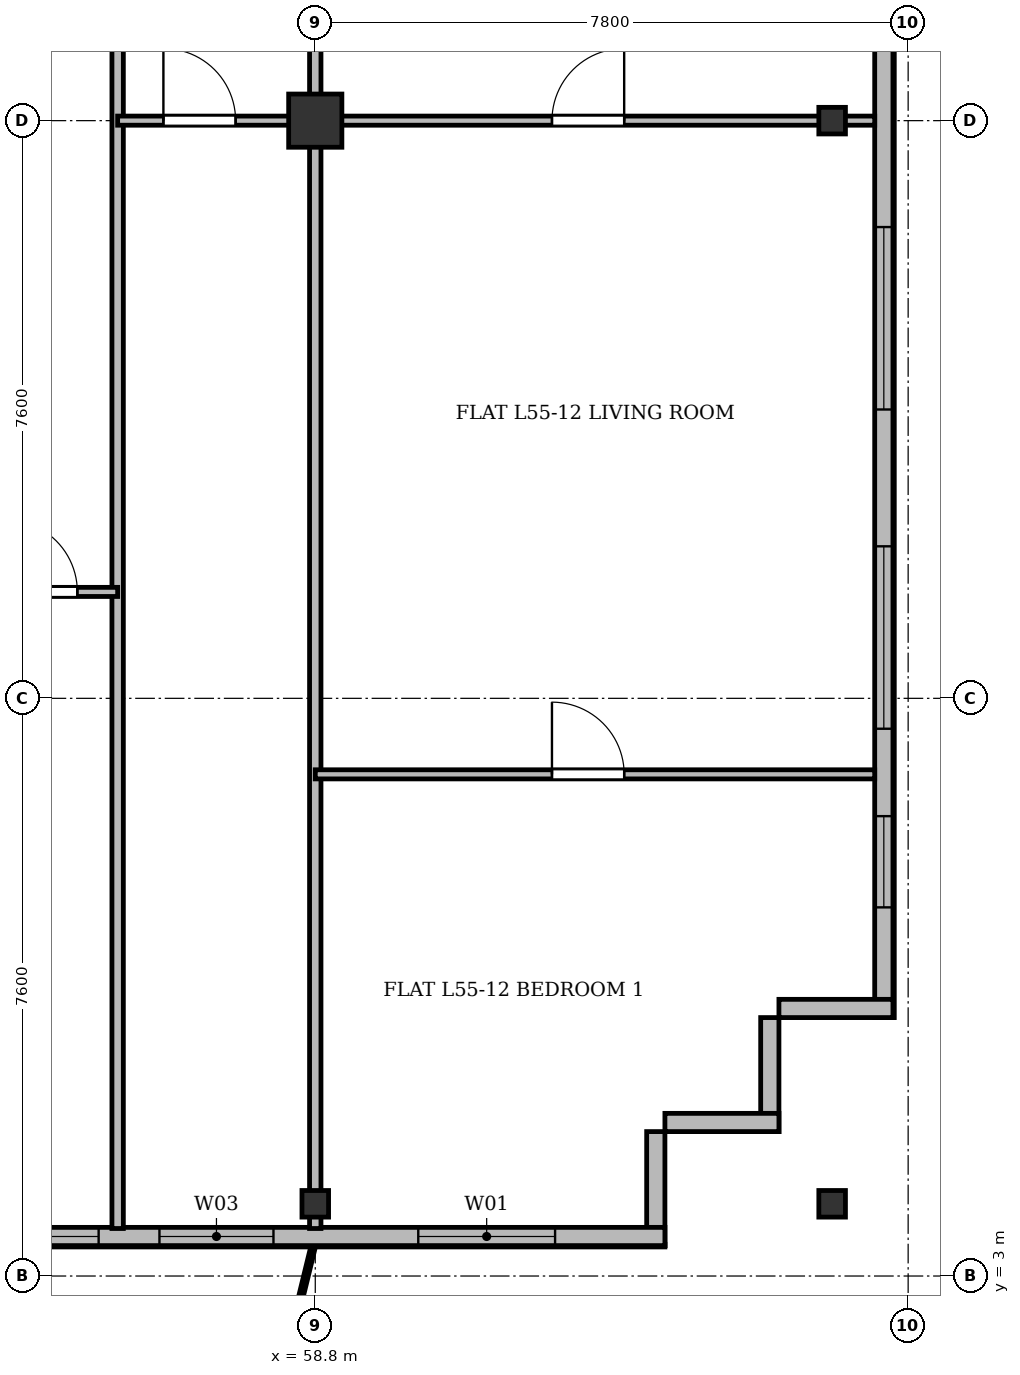
"""IFC4 building model, lengths in metres.
Left out: names, types, materials, properties, quantities, classifications, styles, units other than length and angle.
Written with IfcOpenShell. Run it as: python <this file> out.ifc"""

import sys

from ifc_helpers import new_model, si_unit, direction, frame, frame_2d, origin, origin_2d, place, context, subcontext, project, spatial, rectangle, i_section, extrude, source, transform, mapped, element, fill, save


model = new_model("IFC4")
c1 = context("Model", 3, precision=1e-05, world=origin(), true_north=direction((0.0, 1.0)))
c2 = subcontext(c1, "Body", "Model", "MODEL_VIEW")
j1 = project(units=[si_unit("LENGTHUNIT", "METRE"), si_unit("PLANEANGLEUNIT", "RADIAN")], contexts=[c1])
p1 = place(None, origin())
s1 = spatial("IfcSite", under=j1, at=p1, CompositionType="ELEMENT")
p2 = place(p1, origin())
s2 = spatial("IfcBuilding", under=s1, at=p2, CompositionType="ELEMENT")
p3 = place(p2, frame((0.0, 0.0, 212.1)))
s3 = spatial("IfcBuildingStorey", under=s2, at=p3, CompositionType="ELEMENT", Elevation=212.1)
m1 = source(origin(), c2, "Body", "SweptSolid", [
    extrude(i_section(OverallWidth=0.35, OverallDepth=0.35, WebThickness=0.018, FlangeThickness=0.028, at=origin_2d()), origin(), (0.0, 0.0, 1.0), 3.6),
])
p4 = place(p3, frame((58.8, 3.95, 0.0), z_axis=(0.0, 0.0, 1.0), x_axis=(1.0, 0.0, 0.0)))
e1 = element("IfcColumn", 1, at=p4, inside=s3, PredefinedType="COLUMN", context=c2, shape_type="MappedRepresentation", body=[
    mapped(m1, transform((0.0, 0.0, 0.0), x_axis=(1.0, 0.0, 0.0), y_axis=(0.0, 1.0, 0.0), z_axis=(0.0, 0.0, 1.0), scale=1.0)),
])
m2 = source(origin(), c2, "Body", "SweptSolid", [
    extrude(rectangle(XDim=0.7, YDim=0.7, at=origin_2d()), origin(), (0.0, 0.0, 1.0), 3.6),
])
p5 = place(p3, frame((58.8, 18.2, 0.0), z_axis=(0.0, 0.0, 1.0), x_axis=(1.0, 0.0, 0.0)))
e2 = element("IfcColumn", 2, at=p5, inside=s3, PredefinedType="COLUMN", context=c2, shape_type="MappedRepresentation", body=[
    mapped(m2, transform((0.0, 0.0, 0.0), x_axis=(1.0, 0.0, 0.0), y_axis=(0.0, 1.0, 0.0), z_axis=(0.0, 0.0, 1.0), scale=1.0)),
])
for number, where, z_axis, x_axis in (
    (3, (65.6, 3.95, 0.0), (0.0, 0.0, 1.0), (1.0, 0.0, 0.0)),
    (4, (65.6, 18.2, 0.0), (0.0, 0.0, 1.0), (1.0, 0.0, 0.0)),
):
    element("IfcColumn", number, at=place(p3, frame(where, z_axis=z_axis, x_axis=x_axis)), inside=s3, PredefinedType="COLUMN", context=c2, shape_type="MappedRepresentation", body=[
        mapped(m1, transform((0.0, 0.0, 0.0), x_axis=(1.0, 0.0, 0.0), y_axis=(0.0, 1.0, 0.0), z_axis=(0.0, 0.0, 1.0), scale=1.0)),
    ])
p6 = place(p3, frame((66.28, 45.5, 0.0), z_axis=(0.0, 0.0, 1.0), x_axis=(0.0, -1.0, 0.0)))
e5 = element("IfcWall", 5, at=p6, inside=s3, PredefinedType="SOLIDWALL", context=c2, shape_type="SweptSolid", body=[
    extrude(rectangle(XDim=39.1, YDim=0.24, at=frame_2d((19.55, 0.0))), origin(), (0.0, 0.0, 1.0), 3.36),
])
p7 = place(p6, frame((36.45, 0.0, 0.92)))
e6 = element("IfcOpeningElement", 6, at=p7, cuts=e5, PredefinedType="OPENING", context=c2, shape_type="SweptSolid", body=[
    extrude(rectangle(XDim=1.2, YDim=1.65, at=frame_2d((0.6, 0.825))), frame((0.0, 0.13, 0.0), z_axis=(0.0, -1.0, 0.0), x_axis=(1.0, 0.0, 0.0)), (0.0, 0.0, 1.0), 0.26),
])
p8 = place(p6, frame((32.9, 0.0, 0.92)))
e7 = element("IfcOpeningElement", 7, at=p8, cuts=e5, PredefinedType="OPENING", context=c2, shape_type="SweptSolid", body=[
    extrude(rectangle(XDim=2.4, YDim=2.1, at=frame_2d((1.2, 1.05))), frame((0.0, 0.13, 0.0), z_axis=(0.0, -1.0, 0.0), x_axis=(1.0, 0.0, 0.0)), (0.0, 0.0, 1.0), 0.26),
])
p9 = place(p6, frame((28.7, 0.0, 0.92)))
e8 = element("IfcOpeningElement", 8, at=p9, cuts=e5, PredefinedType="OPENING", context=c2, shape_type="SweptSolid", body=[
    extrude(rectangle(XDim=2.4, YDim=2.1, at=frame_2d((1.2, 1.05))), frame((0.0, 0.13, 0.0), z_axis=(0.0, -1.0, 0.0), x_axis=(1.0, 0.0, 0.0)), (0.0, 0.0, 1.0), 0.26),
])
p10 = place(p6, frame((21.5, 0.0, 0.92)))
e9 = element("IfcOpeningElement", 9, at=p10, cuts=e5, PredefinedType="OPENING", context=c2, shape_type="SweptSolid", body=[
    extrude(rectangle(XDim=2.4, YDim=2.1, at=frame_2d((1.2, 1.05))), frame((0.0, 0.13, 0.0), z_axis=(0.0, -1.0, 0.0), x_axis=(1.0, 0.0, 0.0)), (0.0, 0.0, 1.0), 0.26),
])
p11 = place(p6, frame((7.5, 0.0, 0.92)))
e10 = element("IfcOpeningElement", 10, at=p11, cuts=e5, PredefinedType="OPENING", context=c2, shape_type="SweptSolid", body=[
    extrude(rectangle(XDim=2.4, YDim=2.1, at=frame_2d((1.2, 1.05))), frame((0.0, 0.13, 0.0), z_axis=(0.0, -1.0, 0.0), x_axis=(1.0, 0.0, 0.0)), (0.0, 0.0, 1.0), 0.26),
])
p12 = place(p6, frame((4.5, 0.0, 0.92)))
e11 = element("IfcOpeningElement", 11, at=p12, cuts=e5, PredefinedType="OPENING", context=c2, shape_type="SweptSolid", body=[
    extrude(rectangle(XDim=1.2, YDim=1.65, at=frame_2d((0.6, 0.825))), frame((0.0, 0.13, 0.0), z_axis=(0.0, -1.0, 0.0), x_axis=(1.0, 0.0, 0.0)), (0.0, 0.0, 1.0), 0.26),
])
p13 = place(p6, frame((1.15, 0.0, 0.92)))
e12 = element("IfcOpeningElement", 12, at=p13, cuts=e5, PredefinedType="OPENING", context=c2, shape_type="SweptSolid", body=[
    extrude(rectangle(XDim=1.2, YDim=1.65, at=frame_2d((0.6, 0.825))), frame((0.0, 0.13, 0.0), z_axis=(0.0, -1.0, 0.0), x_axis=(1.0, 0.0, 0.0)), (0.0, 0.0, 1.0), 0.26),
])
p14 = place(p3, frame((66.4, 6.52, 0.0), z_axis=(0.0, 0.0, 1.0), x_axis=(-1.0, 0.0, 0.0)))
e13 = element("IfcWall", 13, at=p14, inside=s3, PredefinedType="SOLIDWALL", context=c2, shape_type="SweptSolid", body=[
    extrude(rectangle(XDim=1.5, YDim=0.24, at=frame_2d((0.75, 0.0))), origin(), (0.0, 0.0, 1.0), 2.86),
])
for number, where, z_axis, x_axis in (
    (14, (64.78, 6.4, 0.0), (0.0, 0.0, 1.0), (0.0, -1.0, 0.0)),
    (15, (64.9, 5.02, 0.0), (0.0, 0.0, 1.0), (-1.0, 0.0, 0.0)),
):
    element("IfcWall", number, at=place(p3, frame(where, z_axis=z_axis, x_axis=x_axis)), inside=s3, PredefinedType="SOLIDWALL", context=c2, shape_type="SweptSolid", body=[
        extrude(rectangle(XDim=1.5, YDim=0.24, at=frame_2d((0.75, 0.0))), origin(), (0.0, 0.0, 1.0), 3.36),
    ])
p15 = place(p3, frame((63.28, 4.9, 0.0), z_axis=(0.0, 0.0, 1.0), x_axis=(0.0, -1.0, 0.0)))
e16 = element("IfcWall", 16, at=p15, inside=s3, PredefinedType="SOLIDWALL", context=c2, shape_type="SweptSolid", body=[
    extrude(rectangle(XDim=1.5, YDim=0.24, at=frame_2d((0.75, 0.0))), origin(), (0.0, 0.0, 1.0), 2.91),
])
p16 = place(p3, frame((63.4, 3.52, 0.0), z_axis=(0.0, 0.0, 1.0), x_axis=(-1.0, 0.0, 0.0)))
e17 = element("IfcWall", 17, at=p16, inside=s3, PredefinedType="SOLIDWALL", context=c2, shape_type="SweptSolid", body=[
    extrude(rectangle(XDim=52.4, YDim=0.24, at=frame_2d((26.2, 0.0))), origin(), (0.0, 0.0, 1.0), 3.36),
])
p17 = place(p16, frame((1.445, 0.0, 0.9)))
e18 = element("IfcOpeningElement", 18, at=p17, cuts=e17, PredefinedType="OPENING", context=c2, shape_type="SweptSolid", body=[
    extrude(rectangle(XDim=1.8, YDim=1.8, at=frame_2d((0.9, 0.9))), frame((0.0, 0.13, 0.0), z_axis=(0.0, -1.0, 0.0), x_axis=(1.0, 0.0, 0.0)), (0.0, 0.0, 1.0), 0.26),
])
p18 = place(p16, frame((5.15, 0.0, 0.9)))
e19 = element("IfcOpeningElement", 19, at=p18, cuts=e17, PredefinedType="OPENING", context=c2, shape_type="SweptSolid", body=[
    extrude(rectangle(XDim=1.5, YDim=1.75, at=frame_2d((0.75, 0.875))), frame((0.0, 0.13, 0.0), z_axis=(0.0, -1.0, 0.0), x_axis=(1.0, 0.0, 0.0)), (0.0, 0.0, 1.0), 0.26),
])
p19 = place(p16, frame((7.45, 0.0, 0.9)))
e20 = element("IfcOpeningElement", 20, at=p19, cuts=e17, PredefinedType="OPENING", context=c2, shape_type="SweptSolid", body=[
    extrude(rectangle(XDim=1.5, YDim=1.75, at=frame_2d((0.75, 0.875))), frame((0.0, 0.13, 0.0), z_axis=(0.0, -1.0, 0.0), x_axis=(1.0, 0.0, 0.0)), (0.0, 0.0, 1.0), 0.26),
])
p20 = place(p16, frame((9.8, 0.0, 0.9)))
e21 = element("IfcOpeningElement", 21, at=p20, cuts=e17, PredefinedType="OPENING", context=c2, shape_type="SweptSolid", body=[
    extrude(rectangle(XDim=2.0, YDim=1.95, at=frame_2d((1.0, 0.975))), frame((0.0, 0.13, 0.0), z_axis=(0.0, -1.0, 0.0), x_axis=(1.0, 0.0, 0.0)), (0.0, 0.0, 1.0), 0.26),
])
p21 = place(p16, frame((14.217, 0.0, 0.0)))
e22 = element("IfcOpeningElement", 22, at=p21, cuts=e17, PredefinedType="OPENING", context=c2, shape_type="SweptSolid", body=[
    extrude(rectangle(XDim=1.2, YDim=2.2, at=frame_2d((0.6, 1.1))), frame((0.0, 0.13, 0.0), z_axis=(0.0, -1.0, 0.0), x_axis=(1.0, 0.0, 0.0)), (0.0, 0.0, 1.0), 0.26),
])
p22 = place(p16, frame((20.034, 0.0, 0.9)))
e23 = element("IfcOpeningElement", 23, at=p22, cuts=e17, PredefinedType="OPENING", context=c2, shape_type="SweptSolid", body=[
    extrude(rectangle(XDim=1.8, YDim=1.8, at=frame_2d((0.9, 0.9))), frame((0.0, 0.13, 0.0), z_axis=(0.0, -1.0, 0.0), x_axis=(1.0, 0.0, 0.0)), (0.0, 0.0, 1.0), 0.26),
])
p23 = place(p16, frame((22.5, 0.0, 0.9)))
e24 = element("IfcOpeningElement", 24, at=p23, cuts=e17, PredefinedType="OPENING", context=c2, shape_type="SweptSolid", body=[
    extrude(rectangle(XDim=2.2, YDim=1.8, at=frame_2d((1.1, 0.9))), frame((0.0, 0.13, 0.0), z_axis=(0.0, -1.0, 0.0), x_axis=(1.0, 0.0, 0.0)), (0.0, 0.0, 1.0), 0.26),
])
p24 = place(p16, frame((25.517, 0.0, 0.9)))
e25 = element("IfcOpeningElement", 25, at=p24, cuts=e17, PredefinedType="OPENING", context=c2, shape_type="SweptSolid", body=[
    extrude(rectangle(XDim=1.5, YDim=1.75, at=frame_2d((0.75, 0.875))), frame((0.0, 0.13, 0.0), z_axis=(0.0, -1.0, 0.0), x_axis=(1.0, 0.0, 0.0)), (0.0, 0.0, 1.0), 0.26),
])
p25 = place(p16, frame((29.2, 0.0, 0.9)))
e26 = element("IfcOpeningElement", 26, at=p25, cuts=e17, PredefinedType="OPENING", context=c2, shape_type="SweptSolid", body=[
    extrude(rectangle(XDim=2.0, YDim=1.95, at=frame_2d((1.0, 0.975))), frame((0.0, 0.13, 0.0), z_axis=(0.0, -1.0, 0.0), x_axis=(1.0, 0.0, 0.0)), (0.0, 0.0, 1.0), 0.26),
])
p26 = place(p16, frame((33.175, 0.0, 0.9)))
e27 = element("IfcOpeningElement", 27, at=p26, cuts=e17, PredefinedType="OPENING", context=c2, shape_type="SweptSolid", body=[
    extrude(rectangle(XDim=1.65, YDim=1.85, at=frame_2d((0.825, 0.925))), frame((0.0, 0.13, 0.0), z_axis=(0.0, -1.0, 0.0), x_axis=(1.0, 0.0, 0.0)), (0.0, 0.0, 1.0), 0.26),
])
p27 = place(p16, frame((35.5, 0.0, 0.9)))
e28 = element("IfcOpeningElement", 28, at=p27, cuts=e17, PredefinedType="OPENING", context=c2, shape_type="SweptSolid", body=[
    extrude(rectangle(XDim=1.8, YDim=1.8, at=frame_2d((0.9, 0.9))), frame((0.0, 0.13, 0.0), z_axis=(0.0, -1.0, 0.0), x_axis=(1.0, 0.0, 0.0)), (0.0, 0.0, 1.0), 0.26),
])
p28 = place(p16, frame((38.05, 0.0, 0.9)))
e29 = element("IfcOpeningElement", 29, at=p28, cuts=e17, PredefinedType="OPENING", context=c2, shape_type="SweptSolid", body=[
    extrude(rectangle(XDim=1.5, YDim=1.75, at=frame_2d((0.75, 0.875))), frame((0.0, 0.13, 0.0), z_axis=(0.0, -1.0, 0.0), x_axis=(1.0, 0.0, 0.0)), (0.0, 0.0, 1.0), 0.26),
])
p29 = place(p16, frame((41.456, 0.0, 0.0)))
e30 = element("IfcOpeningElement", 30, at=p29, cuts=e17, PredefinedType="OPENING", context=c2, shape_type="SweptSolid", body=[
    extrude(rectangle(XDim=1.2, YDim=2.2, at=frame_2d((0.6, 1.1))), frame((0.0, 0.13, 0.0), z_axis=(0.0, -1.0, 0.0), x_axis=(1.0, 0.0, 0.0)), (0.0, 0.0, 1.0), 0.26),
])
p30 = place(p16, frame((43.45, 0.0, 0.9)))
e31 = element("IfcOpeningElement", 31, at=p30, cuts=e17, PredefinedType="OPENING", context=c2, shape_type="SweptSolid", body=[
    extrude(rectangle(XDim=1.5, YDim=1.75, at=frame_2d((0.75, 0.875))), frame((0.0, 0.13, 0.0), z_axis=(0.0, -1.0, 0.0), x_axis=(1.0, 0.0, 0.0)), (0.0, 0.0, 1.0), 0.26),
])
p31 = place(p16, frame((45.675, 0.0, 0.9)))
e32 = element("IfcOpeningElement", 32, at=p31, cuts=e17, PredefinedType="OPENING", context=c2, shape_type="SweptSolid", body=[
    extrude(rectangle(XDim=1.65, YDim=1.85, at=frame_2d((0.825, 0.925))), frame((0.0, 0.13, 0.0), z_axis=(0.0, -1.0, 0.0), x_axis=(1.0, 0.0, 0.0)), (0.0, 0.0, 1.0), 0.26),
])
p32 = place(p16, frame((49.155, 0.0, 0.9)))
e33 = element("IfcOpeningElement", 33, at=p32, cuts=e17, PredefinedType="OPENING", context=c2, shape_type="SweptSolid", body=[
    extrude(rectangle(XDim=1.8, YDim=1.8, at=frame_2d((0.9, 0.9))), frame((0.0, 0.13, 0.0), z_axis=(0.0, -1.0, 0.0), x_axis=(1.0, 0.0, 0.0)), (0.0, 0.0, 1.0), 0.26),
])
p33 = place(p3, frame((58.8, 3.625, 0.0), z_axis=(0.0, 0.0, 1.0), x_axis=(0.0, 1.0, 0.0)))
e34 = element("IfcWall", 34, at=p33, inside=s3, PredefinedType="PARTITIONING", context=c2, shape_type="SweptSolid", body=[
    extrude(rectangle(XDim=27.175, YDim=0.15, at=frame_2d((13.587, 0.0))), origin(), (0.0, 0.0, 1.0), 2.86),
])
p34 = place(p3, frame((56.2, 3.625, 0.0), z_axis=(0.0, 0.0, 1.0), x_axis=(0.0, 1.0, 0.0)))
e35 = element("IfcWall", 35, at=p34, inside=s3, PredefinedType="PARTITIONING", context=c2, shape_type="SweptSolid", body=[
    extrude(rectangle(XDim=27.175, YDim=0.15, at=frame_2d((13.587, 0.0))), origin(), (0.0, 0.0, 1.0), 2.91),
])
p35 = place(p3, frame((54.2, 12.0, 0.0), z_axis=(0.0, 0.0, 1.0), x_axis=(1.0, 0.0, 0.0)))
e36 = element("IfcWall", 36, at=p35, inside=s3, PredefinedType="PARTITIONING", context=c2, shape_type="SweptSolid", body=[
    extrude(rectangle(XDim=2.0, YDim=0.12, at=frame_2d((1.0, 0.0))), origin(), (0.0, 0.0, 1.0), 3.36),
])
p36 = place(p35, frame((0.52, 0.0, 0.0)))
e37 = element("IfcOpeningElement", 37, at=p36, cuts=e36, PredefinedType="OPENING", context=c2, shape_type="SweptSolid", body=[
    extrude(rectangle(XDim=0.95, YDim=2.15, at=frame_2d((0.475, 1.075))), frame((0.0, 0.07, 0.0), z_axis=(0.0, -1.0, 0.0), x_axis=(1.0, 0.0, 0.0)), (0.0, 0.0, 1.0), 0.14),
])
p37 = place(p3, frame((56.2, 18.2, 0.0), z_axis=(0.0, 0.0, 1.0), x_axis=(1.0, 0.0, 0.0)))
e38 = element("IfcWall", 38, at=p37, inside=s3, PredefinedType="PARTITIONING", context=c2, shape_type="SweptSolid", body=[
    extrude(rectangle(XDim=2.6, YDim=0.12, at=frame_2d((1.3, 0.0))), origin(), (0.0, 0.0, 1.0), 2.91),
])
p38 = place(p37, frame((0.602, 0.0, 0.0)))
e39 = element("IfcOpeningElement", 39, at=p38, cuts=e38, PredefinedType="OPENING", context=c2, shape_type="SweptSolid", body=[
    extrude(rectangle(XDim=0.95, YDim=2.15, at=frame_2d((0.475, 1.075))), frame((0.0, 0.07, 0.0), z_axis=(0.0, -1.0, 0.0), x_axis=(1.0, 0.0, 0.0)), (0.0, 0.0, 1.0), 0.14),
])
p39 = place(p3, frame((58.8, 18.2, 0.0), z_axis=(0.0, 0.0, 1.0), x_axis=(1.0, 0.0, 0.0)))
e40 = element("IfcWall", 40, at=p39, inside=s3, PredefinedType="PARTITIONING", context=c2, shape_type="SweptSolid", body=[
    extrude(rectangle(XDim=7.36, YDim=0.12, at=frame_2d((3.68, 0.0))), origin(), (0.0, 0.0, 1.0), 2.91),
])
p40 = place(p39, frame((3.114, 0.0, 0.0)))
e41 = element("IfcOpeningElement", 41, at=p40, cuts=e40, PredefinedType="OPENING", context=c2, shape_type="SweptSolid", body=[
    extrude(rectangle(XDim=0.95, YDim=2.15, at=frame_2d((0.475, 1.075))), frame((0.0, 0.07, 0.0), z_axis=(0.0, -1.0, 0.0), x_axis=(1.0, 0.0, 0.0)), (0.0, 0.0, 1.0), 0.14),
])
p41 = place(p3, frame((58.8, 9.6, 0.0), z_axis=(0.0, 0.0, 1.0), x_axis=(1.0, 0.0, 0.0)))
e42 = element("IfcWall", 42, at=p41, inside=s3, PredefinedType="PARTITIONING", context=c2, shape_type="SweptSolid", body=[
    extrude(rectangle(XDim=7.36, YDim=0.12, at=frame_2d((3.68, 0.0))), origin(), (0.0, 0.0, 1.0), 2.86),
])
p42 = place(p41, frame((3.114, 0.0, 0.0)))
e43 = element("IfcOpeningElement", 43, at=p42, cuts=e42, PredefinedType="OPENING", context=c2, shape_type="SweptSolid", body=[
    extrude(rectangle(XDim=0.95, YDim=2.15, at=frame_2d((0.475, 1.075))), frame((0.0, 0.07, 0.0), z_axis=(0.0, -1.0, 0.0), x_axis=(1.0, 0.0, 0.0)), (0.0, 0.0, 1.0), 0.14),
])
m3 = source(origin(), c2, "Body", "SweptSolid", [
    extrude(rectangle(XDim=1.2, YDim=1.65, at=frame_2d((0.6, 0.825))), frame((0.0, 0.03, 0.0), z_axis=(0.0, -1.0, 0.0), x_axis=(1.0, 0.0, 0.0)), (0.0, 0.0, 1.0), 0.06),
])
p43 = place(p7, origin())
e44 = element("IfcWindow", 44, at=p43, inside=s3, PartitioningType="SINGLE_PANEL", PredefinedType="WINDOW", context=c2, shape_type="MappedRepresentation", body=[
    mapped(m3, transform((0.0, 0.0, 0.0), x_axis=(1.0, 0.0, 0.0), y_axis=(0.0, 1.0, 0.0), z_axis=(0.0, 0.0, 1.0), scale=1.0)),
])
fill(e6, e44)
m4 = source(origin(), c2, "Body", "SweptSolid", [
    extrude(rectangle(XDim=2.4, YDim=2.1, at=frame_2d((1.2, 1.05))), frame((0.0, 0.03, 0.0), z_axis=(0.0, -1.0, 0.0), x_axis=(1.0, 0.0, 0.0)), (0.0, 0.0, 1.0), 0.06),
])
p44 = place(p8, origin())
e45 = element("IfcWindow", 45, at=p44, inside=s3, PartitioningType="SINGLE_PANEL", PredefinedType="WINDOW", context=c2, shape_type="MappedRepresentation", body=[
    mapped(m4, transform((0.0, 0.0, 0.0), x_axis=(1.0, 0.0, 0.0), y_axis=(0.0, 1.0, 0.0), z_axis=(0.0, 0.0, 1.0), scale=1.0)),
])
fill(e7, e45)
p45 = place(p9, origin())
e46 = element("IfcWindow", 46, at=p45, inside=s3, PartitioningType="SINGLE_PANEL", PredefinedType="WINDOW", context=c2, shape_type="MappedRepresentation", body=[
    mapped(m4, transform((0.0, 0.0, 0.0), x_axis=(1.0, 0.0, 0.0), y_axis=(0.0, 1.0, 0.0), z_axis=(0.0, 0.0, 1.0), scale=1.0)),
])
fill(e8, e46)
m5 = source(origin(), c2, "Body", "SweptSolid", [
    extrude(rectangle(XDim=1.8, YDim=1.8, at=frame_2d((0.9, 0.9))), frame((0.0, 0.03, 0.0), z_axis=(0.0, -1.0, 0.0), x_axis=(1.0, 0.0, 0.0)), (0.0, 0.0, 1.0), 0.06),
])
p46 = place(p17, origin())
e47 = element("IfcWindow", 47, at=p46, inside=s3, PartitioningType="SINGLE_PANEL", PredefinedType="WINDOW", context=c2, shape_type="MappedRepresentation", body=[
    mapped(m5, transform((0.0, 0.0, 0.0), x_axis=(1.0, 0.0, 0.0), y_axis=(0.0, 1.0, 0.0), z_axis=(0.0, 0.0, 1.0), scale=1.0)),
])
fill(e18, e47)
m6 = source(origin(), c2, "Body", "SweptSolid", [
    extrude(rectangle(XDim=1.5, YDim=1.75, at=frame_2d((0.75, 0.875))), frame((0.0, 0.03, 0.0), z_axis=(0.0, -1.0, 0.0), x_axis=(1.0, 0.0, 0.0)), (0.0, 0.0, 1.0), 0.06),
])
p47 = place(p18, origin())
e48 = element("IfcWindow", 48, at=p47, inside=s3, PartitioningType="SINGLE_PANEL", PredefinedType="WINDOW", context=c2, shape_type="MappedRepresentation", body=[
    mapped(m6, transform((0.0, 0.0, 0.0), x_axis=(1.0, 0.0, 0.0), y_axis=(0.0, 1.0, 0.0), z_axis=(0.0, 0.0, 1.0), scale=1.0)),
])
fill(e19, e48)
p48 = place(p19, origin())
e49 = element("IfcWindow", 49, at=p48, inside=s3, PartitioningType="SINGLE_PANEL", PredefinedType="WINDOW", context=c2, shape_type="MappedRepresentation", body=[
    mapped(m6, transform((0.0, 0.0, 0.0), x_axis=(1.0, 0.0, 0.0), y_axis=(0.0, 1.0, 0.0), z_axis=(0.0, 0.0, 1.0), scale=1.0)),
])
fill(e20, e49)
m7 = source(origin(), c2, "Body", "SweptSolid", [
    extrude(rectangle(XDim=0.95, YDim=2.15, at=frame_2d((0.475, 1.075))), frame((0.0, 0.025, 0.0), z_axis=(0.0, -1.0, 0.0), x_axis=(1.0, 0.0, 0.0)), (0.0, 0.0, 1.0), 0.05),
])
p49 = place(p36, origin())
e50 = element("IfcDoor", 50, at=p49, inside=s3, OperationType="SINGLE_SWING_LEFT", PredefinedType="DOOR", context=c2, shape_type="MappedRepresentation", body=[
    mapped(m7, transform((0.0, 0.0, 0.0), x_axis=(1.0, 0.0, 0.0), y_axis=(0.0, 1.0, 0.0), z_axis=(0.0, 0.0, 1.0), scale=1.0)),
])
fill(e37, e50)
p50 = place(p38, origin())
e51 = element("IfcDoor", 51, at=p50, inside=s3, OperationType="SINGLE_SWING_LEFT", PredefinedType="DOOR", context=c2, shape_type="MappedRepresentation", body=[
    mapped(m7, transform((0.0, 0.0, 0.0), x_axis=(1.0, 0.0, 0.0), y_axis=(0.0, 1.0, 0.0), z_axis=(0.0, 0.0, 1.0), scale=1.0)),
])
fill(e39, e51)
p51 = place(p40, origin())
e52 = element("IfcDoor", 52, at=p51, inside=s3, OperationType="SINGLE_SWING_RIGHT", PredefinedType="DOOR", context=c2, shape_type="MappedRepresentation", body=[
    mapped(m7, transform((0.0, 0.0, 0.0), x_axis=(1.0, 0.0, 0.0), y_axis=(0.0, 1.0, 0.0), z_axis=(0.0, 0.0, 1.0), scale=1.0)),
])
fill(e41, e52)
p52 = place(p42, origin())
e53 = element("IfcDoor", 53, at=p52, inside=s3, OperationType="SINGLE_SWING_LEFT", PredefinedType="DOOR", context=c2, shape_type="MappedRepresentation", body=[
    mapped(m7, transform((0.0, 0.0, 0.0), x_axis=(1.0, 0.0, 0.0), y_axis=(0.0, 1.0, 0.0), z_axis=(0.0, 0.0, 1.0), scale=1.0)),
])
fill(e43, e53)
save(model, sys.argv[1])
